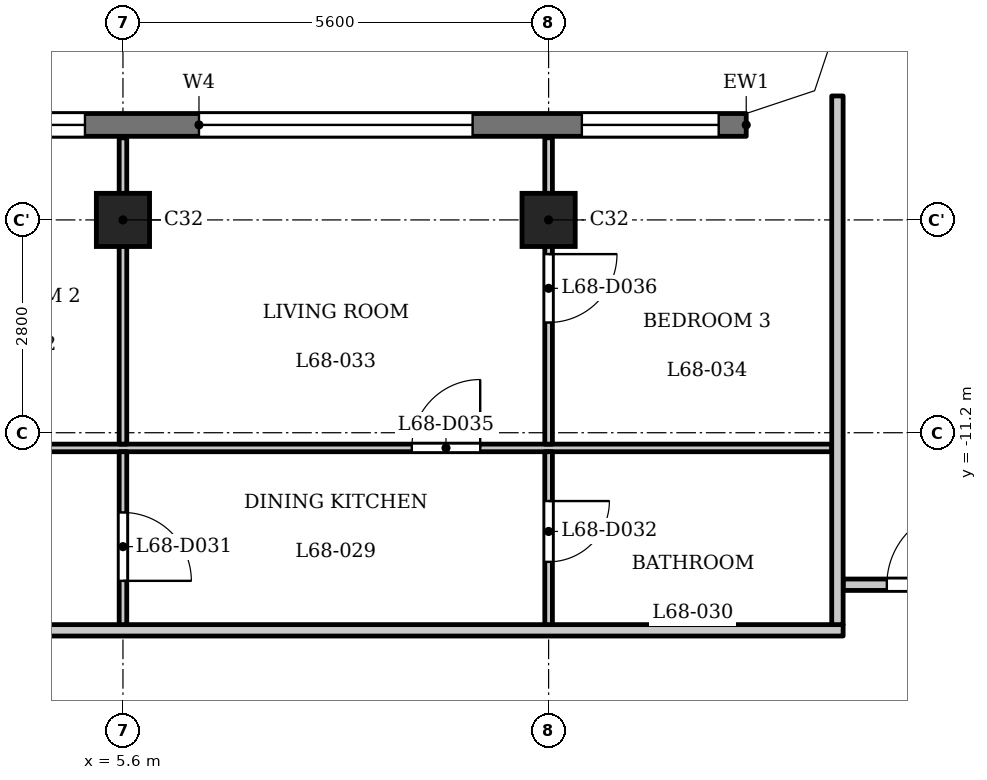
"""IFC4 building model, lengths in metres.
Left out: names, types, materials, properties, quantities, classifications, styles, units other than length and angle.
Written with IfcOpenShell. Run it as: python <this file> out.ifc"""

import sys

from ifc_helpers import new_model, si_unit, direction, frame, frame_2d, origin, origin_2d, place, context, subcontext, project, spatial, polyline, rectangle, outline, extrude, element, fill, save


model = new_model("IFC4")
c1 = context("Model", 3, precision=1e-05, world=origin(), true_north=direction((0.0, 1.0)))
c2 = subcontext(c1, "Body", "Model", "MODEL_VIEW")
j1 = project(units=[si_unit("LENGTHUNIT", "METRE"), si_unit("PLANEANGLEUNIT", "RADIAN")], contexts=[c1])
p1 = place(None, origin())
s1 = spatial("IfcSite", under=j1, at=p1, CompositionType="ELEMENT")
p2 = place(p1, origin())
s2 = spatial("IfcBuilding", under=s1, at=p2, CompositionType="ELEMENT")
p3 = place(p2, frame((0.0, 0.0, 262.7)))
s3 = spatial("IfcBuildingStorey", under=s2, at=p3, CompositionType="ELEMENT", Elevation=262.7)
for number, where, z_axis, x_axis in (
    (1, (5.6, -8.4, 0.0), (0.0, 0.0, 1.0), (1.0, 0.0, 0.0)),
    (2, (11.2, -8.4, 0.0), (0.0, 0.0, 1.0), (1.0, 0.0, 0.0)),
):
    element("IfcColumn", number, at=place(p3, frame(where, z_axis=z_axis, x_axis=x_axis)), inside=s3, PredefinedType="COLUMN", context=c2, shape_type="SweptSolid", body=[
        extrude(rectangle(XDim=0.7, YDim=0.7, at=origin_2d()), origin(), (0.0, 0.0, 1.0), 3.5),
    ])
p4 = place(p3, frame((13.8, -7.15, 0.0), z_axis=(0.0, 0.0, 1.0), x_axis=(-1.0, 0.0, 0.0)))
e3 = element("IfcWall", 3, at=p4, inside=s3, PredefinedType="SOLIDWALL", context=c2, shape_type="SweptSolid", body=[
    extrude(rectangle(XDim=27.6, YDim=0.3, at=frame_2d((13.8, 0.0))), origin(), (0.0, 0.0, 1.0), 3.2),
])
p5 = place(p4, frame((0.363, 0.0, 0.9)))
e4 = element("IfcOpeningElement", 4, at=p5, cuts=e3, PredefinedType="OPENING", context=c2, shape_type="SweptSolid", body=[
    extrude(rectangle(XDim=1.8, YDim=1.25, at=frame_2d((0.9, 0.625))), frame((0.0, 0.16, 0.0), z_axis=(0.0, -1.0, 0.0), x_axis=(1.0, 0.0, 0.0)), (0.0, 0.0, 1.0), 0.32),
])
p6 = place(p4, frame((3.6, 0.0, 1.2)))
e5 = element("IfcOpeningElement", 5, at=p6, cuts=e3, PredefinedType="OPENING", context=c2, shape_type="SweptSolid", body=[
    extrude(rectangle(XDim=3.6, YDim=0.95, at=frame_2d((1.8, 0.475))), frame((0.0, 0.16, 0.0), z_axis=(0.0, -1.0, 0.0), x_axis=(1.0, 0.0, 0.0)), (0.0, 0.0, 1.0), 0.32),
])
p7 = place(p4, frame((8.7, 0.0, 0.9)))
e6 = element("IfcOpeningElement", 6, at=p7, cuts=e3, PredefinedType="OPENING", context=c2, shape_type="SweptSolid", body=[
    extrude(rectangle(XDim=1.8, YDim=1.25, at=frame_2d((0.9, 0.625))), frame((0.0, 0.16, 0.0), z_axis=(0.0, -1.0, 0.0), x_axis=(1.0, 0.0, 0.0)), (0.0, 0.0, 1.0), 0.32),
])
p8 = place(p4, frame((11.5, 0.0, 0.9)))
e7 = element("IfcOpeningElement", 7, at=p8, cuts=e3, PredefinedType="OPENING", context=c2, shape_type="SweptSolid", body=[
    extrude(rectangle(XDim=1.8, YDim=1.25, at=frame_2d((0.9, 0.625))), frame((0.0, 0.16, 0.0), z_axis=(0.0, -1.0, 0.0), x_axis=(1.0, 0.0, 0.0)), (0.0, 0.0, 1.0), 0.32),
])
p9 = place(p4, frame((14.8, 0.0, 1.2)))
e8 = element("IfcOpeningElement", 8, at=p9, cuts=e3, PredefinedType="OPENING", context=c2, shape_type="SweptSolid", body=[
    extrude(rectangle(XDim=3.6, YDim=0.95, at=frame_2d((1.8, 0.475))), frame((0.0, 0.16, 0.0), z_axis=(0.0, -1.0, 0.0), x_axis=(1.0, 0.0, 0.0)), (0.0, 0.0, 1.0), 0.32),
])
p10 = place(p4, frame((20.4, 0.0, 1.2)))
e9 = element("IfcOpeningElement", 9, at=p10, cuts=e3, PredefinedType="OPENING", context=c2, shape_type="SweptSolid", body=[
    extrude(rectangle(XDim=3.6, YDim=0.95, at=frame_2d((1.8, 0.475))), frame((0.0, 0.16, 0.0), z_axis=(0.0, -1.0, 0.0), x_axis=(1.0, 0.0, 0.0)), (0.0, 0.0, 1.0), 0.32),
])
p11 = place(p4, frame((25.438, 0.0, 0.9)))
e10 = element("IfcOpeningElement", 10, at=p11, cuts=e3, PredefinedType="OPENING", context=c2, shape_type="SweptSolid", body=[
    extrude(rectangle(XDim=1.8, YDim=1.25, at=frame_2d((0.9, 0.625))), frame((0.0, 0.16, 0.0), z_axis=(0.0, -1.0, 0.0), x_axis=(1.0, 0.0, 0.0)), (0.0, 0.0, 1.0), 0.32),
])
p12 = place(p3, frame((-15.075, -13.8, 0.0), z_axis=(0.0, 0.0, 1.0), x_axis=(1.0, 0.0, 0.0)))
e11 = element("IfcWall", 11, at=p12, inside=s3, PredefinedType="PARTITIONING", context=c2, shape_type="SweptSolid", body=[
    extrude(rectangle(XDim=30.15, YDim=0.15, at=frame_2d((15.075, 0.0))), origin(), (0.0, 0.0, 1.0), 3.2),
])
p13 = place(p12, frame((2.225, 0.0, 0.0)))
e12 = element("IfcOpeningElement", 12, at=p13, cuts=e11, PredefinedType="OPENING", context=c2, shape_type="SweptSolid", body=[
    extrude(rectangle(XDim=1.0, YDim=2.1, at=frame_2d((0.5, 1.05))), frame((0.0, 0.085, 0.0), z_axis=(0.0, -1.0, 0.0), x_axis=(1.0, 0.0, 0.0)), (0.0, 0.0, 1.0), 0.17),
])
p14 = place(p12, frame((10.825, 0.0, 0.0)))
e13 = element("IfcOpeningElement", 13, at=p14, cuts=e11, PredefinedType="OPENING", context=c2, shape_type="SweptSolid", body=[
    extrude(rectangle(XDim=1.0, YDim=2.1, at=frame_2d((0.5, 1.05))), frame((0.0, 0.085, 0.0), z_axis=(0.0, -1.0, 0.0), x_axis=(1.0, 0.0, 0.0)), (0.0, 0.0, 1.0), 0.17),
])
p15 = place(p12, frame((15.775, 0.0, 0.0)))
e14 = element("IfcOpeningElement", 14, at=p15, cuts=e11, PredefinedType="OPENING", context=c2, shape_type="SweptSolid", body=[
    extrude(rectangle(XDim=1.0, YDim=2.1, at=frame_2d((0.5, 1.05))), frame((0.0, 0.085, 0.0), z_axis=(0.0, -1.0, 0.0), x_axis=(1.0, 0.0, 0.0)), (0.0, 0.0, 1.0), 0.17),
])
p16 = place(p3, frame((15.075, -13.2, 0.0), z_axis=(0.0, 0.0, 1.0), x_axis=(1.0, 0.0, 0.0)))
e15 = element("IfcWall", 15, at=p16, inside=s3, PredefinedType="PARTITIONING", context=c2, shape_type="SweptSolid", body=[
    extrude(rectangle(XDim=2.325, YDim=0.15, at=frame_2d((1.163, 0.0))), origin(), (0.0, 0.0, 1.0), 3.2),
])
p17 = place(p16, frame((0.575, 0.0, 0.0)))
e16 = element("IfcOpeningElement", 16, at=p17, cuts=e15, PredefinedType="OPENING", context=c2, shape_type="SweptSolid", body=[
    extrude(rectangle(XDim=1.0, YDim=2.1, at=frame_2d((0.5, 1.05))), frame((0.0, 0.085, 0.0), z_axis=(0.0, -1.0, 0.0), x_axis=(1.0, 0.0, 0.0)), (0.0, 0.0, 1.0), 0.17),
])
p18 = place(p3, frame((-14.925, -11.4, 0.0), z_axis=(0.0, 0.0, 1.0), x_axis=(1.0, 0.0, 0.0)))
e17 = element("IfcWall", 17, at=p18, inside=s3, PredefinedType="PARTITIONING", context=c2, shape_type="SweptSolid", body=[
    extrude(rectangle(XDim=29.85, YDim=0.1, at=frame_2d((14.925, 0.0))), origin(), (0.0, 0.0, 1.0), 3.2),
])
p19 = place(p18, frame((7.875, 0.0, 0.0)))
e18 = element("IfcOpeningElement", 18, at=p19, cuts=e17, PredefinedType="OPENING", context=c2, shape_type="SweptSolid", body=[
    extrude(rectangle(XDim=0.8, YDim=2.1, at=frame_2d((0.4, 1.05))), frame((0.0, 0.06, 0.0), z_axis=(0.0, -1.0, 0.0), x_axis=(1.0, 0.0, 0.0)), (0.0, 0.0, 1.0), 0.12),
])
p20 = place(p18, frame((1.175, 0.0, 0.0)))
e19 = element("IfcOpeningElement", 19, at=p20, cuts=e17, PredefinedType="OPENING", context=c2, shape_type="SweptSolid", body=[
    extrude(rectangle(XDim=0.9, YDim=2.1, at=frame_2d((0.45, 1.05))), frame((0.0, 0.06, 0.0), z_axis=(0.0, -1.0, 0.0), x_axis=(1.0, 0.0, 0.0)), (0.0, 0.0, 1.0), 0.12),
])
p21 = place(p18, frame((13.475, 0.0, 0.0)))
e20 = element("IfcOpeningElement", 20, at=p21, cuts=e17, PredefinedType="OPENING", context=c2, shape_type="SweptSolid", body=[
    extrude(rectangle(XDim=0.8, YDim=2.1, at=frame_2d((0.4, 1.05))), frame((0.0, 0.06, 0.0), z_axis=(0.0, -1.0, 0.0), x_axis=(1.0, 0.0, 0.0)), (0.0, 0.0, 1.0), 0.12),
])
p22 = place(p18, frame((9.775, 0.0, 0.0)))
e21 = element("IfcOpeningElement", 21, at=p22, cuts=e17, PredefinedType="OPENING", context=c2, shape_type="SweptSolid", body=[
    extrude(rectangle(XDim=0.9, YDim=2.1, at=frame_2d((0.45, 1.05))), frame((0.0, 0.06, 0.0), z_axis=(0.0, -1.0, 0.0), x_axis=(1.0, 0.0, 0.0)), (0.0, 0.0, 1.0), 0.12),
])
p23 = place(p18, frame((16.675, 0.0, 0.0)))
e22 = element("IfcOpeningElement", 22, at=p23, cuts=e17, PredefinedType="OPENING", context=c2, shape_type="SweptSolid", body=[
    extrude(rectangle(XDim=0.9, YDim=2.1, at=frame_2d((0.45, 1.05))), frame((0.0, 0.06, 0.0), z_axis=(0.0, -1.0, 0.0), x_axis=(1.0, 0.0, 0.0)), (0.0, 0.0, 1.0), 0.12),
])
p24 = place(p18, frame((18.225, 0.0, 0.0)))
e23 = element("IfcOpeningElement", 23, at=p24, cuts=e17, PredefinedType="OPENING", context=c2, shape_type="SweptSolid", body=[
    extrude(rectangle(XDim=0.9, YDim=2.1, at=frame_2d((0.45, 1.05))), frame((0.0, 0.06, 0.0), z_axis=(0.0, -1.0, 0.0), x_axis=(1.0, 0.0, 0.0)), (0.0, 0.0, 1.0), 0.12),
])
p25 = place(p18, frame((24.325, 0.0, 0.0)))
e24 = element("IfcOpeningElement", 24, at=p25, cuts=e17, PredefinedType="OPENING", context=c2, shape_type="SweptSolid", body=[
    extrude(rectangle(XDim=0.9, YDim=2.1, at=frame_2d((0.45, 1.05))), frame((0.0, 0.06, 0.0), z_axis=(0.0, -1.0, 0.0), x_axis=(1.0, 0.0, 0.0)), (0.0, 0.0, 1.0), 0.12),
])
p26 = place(p3, frame((5.6, -13.725, 0.0), z_axis=(0.0, 0.0, 1.0), x_axis=(0.0, 1.0, 0.0)))
e25 = element("IfcWall", 25, at=p26, inside=s3, PredefinedType="PARTITIONING", context=c2, shape_type="SweptSolid", body=[
    extrude(rectangle(XDim=2.275, YDim=0.1, at=frame_2d((1.138, 0.0))), origin(), (0.0, 0.0, 1.0), 3.2),
])
p27 = place(p26, frame((0.576, 0.0, 0.0)))
e26 = element("IfcOpeningElement", 26, at=p27, cuts=e25, PredefinedType="OPENING", context=c2, shape_type="SweptSolid", body=[
    extrude(rectangle(XDim=0.9, YDim=2.1, at=frame_2d((0.45, 1.05))), frame((0.0, 0.06, 0.0), z_axis=(0.0, -1.0, 0.0), x_axis=(1.0, 0.0, 0.0)), (0.0, 0.0, 1.0), 0.12),
])
p28 = place(p3, frame((5.6, -11.35, 0.0), z_axis=(0.0, 0.0, 1.0), x_axis=(0.0, 1.0, 0.0)))
e27 = element("IfcWall", 27, at=p28, inside=s3, PredefinedType="PARTITIONING", context=c2, shape_type="SweptSolid", body=[
    extrude(rectangle(XDim=4.03, YDim=0.1, at=frame_2d((2.015, 0.0))), origin(), (0.0, 0.0, 1.0), 3.2),
])
p29 = place(p3, frame((11.2, -13.725, 0.0), z_axis=(0.0, 0.0, 1.0), x_axis=(0.0, 1.0, 0.0)))
e28 = element("IfcWall", 28, at=p29, inside=s3, PredefinedType="PARTITIONING", context=c2, shape_type="SweptSolid", body=[
    extrude(rectangle(XDim=2.275, YDim=0.1, at=frame_2d((1.138, 0.0))), origin(), (0.0, 0.0, 1.0), 3.2),
])
p30 = place(p29, frame((0.826, 0.0, 0.0)))
e29 = element("IfcOpeningElement", 29, at=p30, cuts=e28, PredefinedType="OPENING", context=c2, shape_type="SweptSolid", body=[
    extrude(rectangle(XDim=0.8, YDim=2.1, at=frame_2d((0.4, 1.05))), frame((0.0, 0.06, 0.0), z_axis=(0.0, -1.0, 0.0), x_axis=(1.0, 0.0, 0.0)), (0.0, 0.0, 1.0), 0.12),
])
p31 = place(p3, frame((11.2, -11.35, 0.0), z_axis=(0.0, 0.0, 1.0), x_axis=(0.0, 1.0, 0.0)))
e30 = element("IfcWall", 30, at=p31, inside=s3, PredefinedType="PARTITIONING", context=c2, shape_type="SweptSolid", body=[
    extrude(rectangle(XDim=4.03, YDim=0.1, at=frame_2d((2.015, 0.0))), origin(), (0.0, 0.0, 1.0), 3.2),
])
p32 = place(p31, frame((1.6, 0.0, 0.0)))
e31 = element("IfcOpeningElement", 31, at=p32, cuts=e30, PredefinedType="OPENING", context=c2, shape_type="SweptSolid", body=[
    extrude(rectangle(XDim=0.9, YDim=2.1, at=frame_2d((0.45, 1.05))), frame((0.0, 0.06, 0.0), z_axis=(0.0, -1.0, 0.0), x_axis=(1.0, 0.0, 0.0)), (0.0, 0.0, 1.0), 0.12),
])
p33 = place(p3, frame((15.0, -13.725, 0.0), z_axis=(0.0, 0.0, 1.0), x_axis=(0.0, 1.0, 0.0)))
e32 = element("IfcWall", 32, at=p33, inside=s3, PredefinedType="PARTITIONING", context=c2, shape_type="SweptSolid", body=[
    extrude(rectangle(XDim=6.956, YDim=0.15, at=frame_2d((3.478, 0.0))), origin(), (0.0, 0.0, 1.0), 3.2),
])
p34 = place(p3, origin())
e33 = element("IfcWall", 33, at=p34, inside=s3, PredefinedType="SOLIDWALL", context=c2, shape_type="SweptSolid", body=[
    extrude(outline(polyline([(14.937, -6.937), (15.3, -5.849), (15.3, -5.8), (15.0, -5.8), (14.7, -6.7), (13.8, -7.0), (13.8, -7.3), (13.849, -7.3), (14.937, -6.937)])), origin(), (0.0, 0.0, 1.0), 3.2),
])
p35 = place(p17, origin())
e34 = element("IfcDoor", 34, at=p35, inside=s3, OperationType="SINGLE_SWING_LEFT", PredefinedType="DOOR", context=c2, shape_type="SweptSolid", body=[
    extrude(rectangle(XDim=1.0, YDim=2.1, at=frame_2d((0.5, 1.05))), frame((0.0, 0.025, 0.0), z_axis=(0.0, -1.0, 0.0), x_axis=(1.0, 0.0, 0.0)), (0.0, 0.0, 1.0), 0.05),
])
fill(e16, e34)
p36 = place(p27, origin())
e35 = element("IfcDoor", 35, at=p36, inside=s3, OperationType="SINGLE_SWING_LEFT", PredefinedType="DOOR", context=c2, shape_type="SweptSolid", body=[
    extrude(rectangle(XDim=0.9, YDim=2.1, at=frame_2d((0.45, 1.05))), frame((0.0, 0.025, 0.0), z_axis=(0.0, -1.0, 0.0), x_axis=(1.0, 0.0, 0.0)), (0.0, 0.0, 1.0), 0.05),
])
fill(e26, e35)
p37 = place(p30, origin())
e36 = element("IfcDoor", 36, at=p37, inside=s3, OperationType="SINGLE_SWING_RIGHT", PredefinedType="DOOR", context=c2, shape_type="SweptSolid", body=[
    extrude(rectangle(XDim=0.8, YDim=2.1, at=frame_2d((0.4, 1.05))), frame((0.0, 0.025, 0.0), z_axis=(0.0, -1.0, 0.0), x_axis=(1.0, 0.0, 0.0)), (0.0, 0.0, 1.0), 0.05),
])
fill(e29, e36)
p38 = place(p25, origin())
e37 = element("IfcDoor", 37, at=p38, inside=s3, OperationType="SINGLE_SWING_LEFT", PredefinedType="DOOR", context=c2, shape_type="SweptSolid", body=[
    extrude(rectangle(XDim=0.9, YDim=2.1, at=frame_2d((0.45, 1.05))), frame((0.0, 0.025, 0.0), z_axis=(0.0, -1.0, 0.0), x_axis=(1.0, 0.0, 0.0)), (0.0, 0.0, 1.0), 0.05),
])
fill(e24, e37)
p39 = place(p32, origin())
e38 = element("IfcDoor", 38, at=p39, inside=s3, OperationType="SINGLE_SWING_RIGHT", PredefinedType="DOOR", context=c2, shape_type="SweptSolid", body=[
    extrude(rectangle(XDim=0.9, YDim=2.1, at=frame_2d((0.45, 1.05))), frame((0.0, 0.025, 0.0), z_axis=(0.0, -1.0, 0.0), x_axis=(1.0, 0.0, 0.0)), (0.0, 0.0, 1.0), 0.05),
])
fill(e31, e38)
p40 = place(p5, origin())
e39 = element("IfcWindow", 39, at=p40, inside=s3, PartitioningType="SINGLE_PANEL", PredefinedType="WINDOW", context=c2, shape_type="SweptSolid", body=[
    extrude(rectangle(XDim=1.8, YDim=1.25, at=frame_2d((0.9, 0.625))), frame((0.0, 0.03, 0.0), z_axis=(0.0, -1.0, 0.0), x_axis=(1.0, 0.0, 0.0)), (0.0, 0.0, 1.0), 0.06),
])
fill(e4, e39)
p41 = place(p6, origin())
e40 = element("IfcWindow", 40, at=p41, inside=s3, PartitioningType="SINGLE_PANEL", PredefinedType="WINDOW", context=c2, shape_type="SweptSolid", body=[
    extrude(rectangle(XDim=3.6, YDim=0.95, at=frame_2d((1.8, 0.475))), frame((0.0, 0.03, 0.0), z_axis=(0.0, -1.0, 0.0), x_axis=(1.0, 0.0, 0.0)), (0.0, 0.0, 1.0), 0.06),
])
fill(e5, e40)
p42 = place(p7, origin())
e41 = element("IfcWindow", 41, at=p42, inside=s3, PartitioningType="SINGLE_PANEL", PredefinedType="WINDOW", context=c2, shape_type="SweptSolid", body=[
    extrude(rectangle(XDim=1.8, YDim=1.25, at=frame_2d((0.9, 0.625))), frame((0.0, 0.03, 0.0), z_axis=(0.0, -1.0, 0.0), x_axis=(1.0, 0.0, 0.0)), (0.0, 0.0, 1.0), 0.06),
])
fill(e6, e41)
save(model, sys.argv[1])
